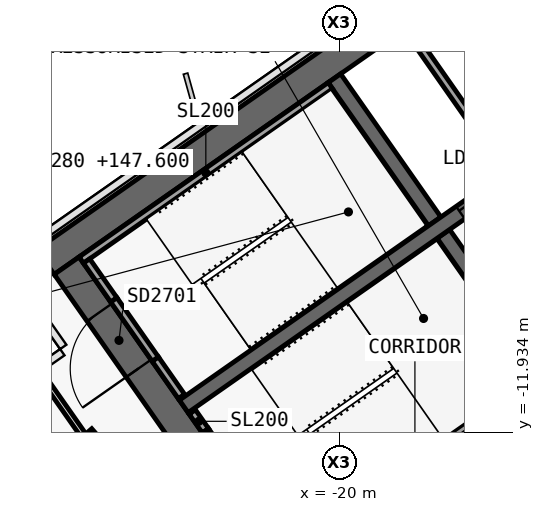
"""IFC4 building model, lengths in metres.
Left out: names, types, materials, properties, quantities, classifications, styles, units other than length and angle.
Written with IfcOpenShell. Run it as: python <this file> out.ifc"""

import sys

from ifc_helpers import new_model, si_unit, direction, frame, frame_2d, origin, place, context, subcontext, project, spatial, polyline, rectangle, outline, extrude, element, fill, save


model = new_model("IFC4")
c1 = context("Model", 3, precision=1e-05, world=origin(), true_north=direction((0.0, 1.0)))
c2 = subcontext(c1, "Body", "Model", "MODEL_VIEW")
j1 = project(units=[si_unit("LENGTHUNIT", "METRE"), si_unit("PLANEANGLEUNIT", "RADIAN")], contexts=[c1])
p1 = place(None, origin())
s1 = spatial("IfcSite", under=j1, at=p1, CompositionType="ELEMENT")
p2 = place(p1, origin())
s2 = spatial("IfcBuilding", under=s1, at=p2, CompositionType="ELEMENT")
p3 = place(p2, frame((0.0, 0.0, 147.6)))
s3 = spatial("IfcBuildingStorey", under=s2, at=p3, CompositionType="ELEMENT", Elevation=147.6)
p4 = place(p3, frame((0.029, 11.984, 0.0), z_axis=(0.0, 0.0, 1.0), x_axis=(-0.819151382952, -0.573577380837, 0.0)))
e1 = element("IfcWall", 1, at=p4, inside=s3, PredefinedType="SHEAR", context=c2, shape_type="SweptSolid", body=[
    extrude(outline(polyline([(33.898, 0.4), (0.56, 0.4), (-0.0, -0.4), (33.898, -0.4), (33.898, 0.4)])), origin(), (0.0, 0.0, 1.0), 3.9),
])
p5 = place(p3, frame((0.029, -0.712, 0.0), z_axis=(0.0, 0.0, 1.0), x_axis=(-0.819151758019, -0.573576845187, 0.0)))
e2 = element("IfcWall", 2, at=p5, inside=s3, PredefinedType="SHEAR", context=c2, shape_type="SweptSolid", body=[
    extrude(outline(polyline([(26.616, 0.4), (0.56, 0.4), (-0.0, -0.4), (26.616, -0.4), (26.616, 0.4)])), origin(), (0.0, 0.0, 1.0), 3.9),
])
p6 = place(p5, frame((2.966, 0.0, 0.0)))
e3 = element("IfcOpeningElement", 3, at=p6, cuts=e2, PredefinedType="OPENING", context=c2, shape_type="SweptSolid", body=[
    extrude(rectangle(XDim=2.4, YDim=2.1, at=frame_2d((1.2, 1.05))), frame((0.0, 0.41, 0.0), z_axis=(0.0, -1.0, 0.0), x_axis=(1.0, 0.0, 0.0)), (0.0, 0.0, 1.0), 0.82),
])
p7 = place(p5, frame((11.916, 0.0, 0.0)))
e4 = element("IfcOpeningElement", 4, at=p7, cuts=e2, PredefinedType="OPENING", context=c2, shape_type="SweptSolid", body=[
    extrude(rectangle(XDim=2.4, YDim=2.1, at=frame_2d((1.2, 1.05))), frame((0.0, 0.41, 0.0), z_axis=(0.0, -1.0, 0.0), x_axis=(1.0, 0.0, 0.0)), (0.0, 0.0, 1.0), 0.82),
])
p8 = place(p3, frame((-21.675, -15.421, 0.0), z_axis=(0.0, 0.0, 1.0), x_axis=(-0.573581815061, 0.819148278049, 0.0)))
e5 = element("IfcWall", 5, at=p8, inside=s3, PredefinedType="SHEAR", context=c2, shape_type="SweptSolid", body=[
    extrude(outline(polyline([(0.0, 0.4), (0.0, -0.4), (9.6, -0.4), (9.6, 0.4), (0.0, 0.4)])), origin(), (0.0, 0.0, 1.0), 3.9),
])
p9 = place(p8, frame((6.3, 0.0, 0.0)))
e6 = element("IfcOpeningElement", 6, at=p9, cuts=e5, PredefinedType="OPENING", context=c2, shape_type="SweptSolid", body=[
    extrude(rectangle(XDim=1.8, YDim=2.1, at=frame_2d((0.9, 1.05))), frame((0.0, 0.41, 0.0), z_axis=(0.0, -1.0, 0.0), x_axis=(1.0, 0.0, 0.0)), (0.0, 0.0, 1.0), 0.82),
])
p10 = place(p8, frame((2.1, 0.0, 0.0)))
e7 = element("IfcOpeningElement", 7, at=p10, cuts=e5, PredefinedType="OPENING", context=c2, shape_type="SweptSolid", body=[
    extrude(rectangle(XDim=1.8, YDim=2.1, at=frame_2d((0.9, 1.05))), frame((0.0, 0.41, 0.0), z_axis=(0.0, -1.0, 0.0), x_axis=(1.0, 0.0, 0.0)), (0.0, 0.0, 1.0), 0.82),
])
p11 = place(p3, frame((-14.63, -10.488, 0.0), z_axis=(0.0, 0.0, 1.0), x_axis=(-0.573611936273, 0.819127185829, 0.0)))
e8 = element("IfcWall", 8, at=p11, inside=s3, PredefinedType="SHEAR", context=c2, shape_type="SweptSolid", body=[
    extrude(outline(polyline([(4.6, 0.2), (0.0, 0.2), (0.0, -0.2), (4.6, -0.2), (4.6, 0.2)])), origin(), (0.0, 0.0, 1.0), 3.9),
])
p12 = place(p3, frame((-17.498, -6.392, 0.0), z_axis=(0.0, 0.0, 1.0), x_axis=(-0.573611936273, 0.819127185829, 0.0)))
e9 = element("IfcWall", 9, at=p12, inside=s3, PredefinedType="SHEAR", context=c2, shape_type="SweptSolid", body=[
    extrude(outline(polyline([(4.6, -0.2), (4.6, 0.2), (0.0, 0.2), (0.0, -0.2), (4.6, -0.2)])), origin(), (0.0, 0.0, 1.0), 3.9),
])
p13 = place(p3, frame((-2.638, 3.768, 0.0), z_axis=(0.0, 0.0, 1.0), x_axis=(-0.81915267502, -0.573575535572, 0.0)))
e10 = element("IfcWall", 10, at=p13, inside=s3, PredefinedType="SHEAR", context=c2, shape_type="SweptSolid", body=[
    extrude(outline(polyline([(26.2, 0.2), (0.0, 0.2), (0.0, -0.2), (26.2, -0.2), (26.2, 0.2)])), origin(), (0.0, 0.0, 1.0), 3.9),
])
p14 = place(p13, frame((1.169, 0.0, 0.0)))
e11 = element("IfcOpeningElement", 11, at=p14, cuts=e10, PredefinedType="OPENING", context=c2, shape_type="SweptSolid", body=[
    extrude(rectangle(XDim=1.1, YDim=2.1, at=frame_2d((0.55, 1.05))), frame((0.0, 0.21, 0.0), z_axis=(0.0, -1.0, 0.0), x_axis=(1.0, 0.0, 0.0)), (0.0, 0.0, 1.0), 0.42),
])
p15 = place(p13, frame((3.206, 0.0, 0.0)))
e12 = element("IfcOpeningElement", 12, at=p15, cuts=e10, PredefinedType="OPENING", context=c2, shape_type="SweptSolid", body=[
    extrude(rectangle(XDim=1.1, YDim=2.1, at=frame_2d((0.55, 1.05))), frame((0.0, 0.21, 0.0), z_axis=(0.0, -1.0, 0.0), x_axis=(1.0, 0.0, 0.0)), (0.0, 0.0, 1.0), 0.42),
])
p16 = place(p13, frame((5.244, 0.0, 0.0)))
e13 = element("IfcOpeningElement", 13, at=p16, cuts=e10, PredefinedType="OPENING", context=c2, shape_type="SweptSolid", body=[
    extrude(rectangle(XDim=1.1, YDim=2.1, at=frame_2d((0.55, 1.05))), frame((0.0, 0.21, 0.0), z_axis=(0.0, -1.0, 0.0), x_axis=(1.0, 0.0, 0.0)), (0.0, 0.0, 1.0), 0.42),
])
p17 = place(p13, frame((7.281, 0.0, 0.0)))
e14 = element("IfcOpeningElement", 14, at=p17, cuts=e10, PredefinedType="OPENING", context=c2, shape_type="SweptSolid", body=[
    extrude(rectangle(XDim=1.1, YDim=2.1, at=frame_2d((0.55, 1.05))), frame((0.0, 0.21, 0.0), z_axis=(0.0, -1.0, 0.0), x_axis=(1.0, 0.0, 0.0)), (0.0, 0.0, 1.0), 0.42),
])
p18 = place(p13, frame((9.688, 0.0, 0.0)))
e15 = element("IfcOpeningElement", 15, at=p18, cuts=e10, PredefinedType="OPENING", context=c2, shape_type="SweptSolid", body=[
    extrude(rectangle(XDim=1.1, YDim=2.1, at=frame_2d((0.55, 1.05))), frame((0.0, 0.21, 0.0), z_axis=(0.0, -1.0, 0.0), x_axis=(1.0, 0.0, 0.0)), (0.0, 0.0, 1.0), 0.42),
])
p19 = place(p13, frame((11.863, 0.0, 0.0)))
e16 = element("IfcOpeningElement", 16, at=p19, cuts=e10, PredefinedType="OPENING", context=c2, shape_type="SweptSolid", body=[
    extrude(rectangle(XDim=1.1, YDim=2.1, at=frame_2d((0.55, 1.05))), frame((0.0, 0.21, 0.0), z_axis=(0.0, -1.0, 0.0), x_axis=(1.0, 0.0, 0.0)), (0.0, 0.0, 1.0), 0.42),
])
p20 = place(p13, frame((14.038, 0.0, 0.0)))
e17 = element("IfcOpeningElement", 17, at=p20, cuts=e10, PredefinedType="OPENING", context=c2, shape_type="SweptSolid", body=[
    extrude(rectangle(XDim=1.1, YDim=2.1, at=frame_2d((0.55, 1.05))), frame((0.0, 0.21, 0.0), z_axis=(0.0, -1.0, 0.0), x_axis=(1.0, 0.0, 0.0)), (0.0, 0.0, 1.0), 0.42),
])
p21 = place(p13, frame((16.212, 0.0, 0.0)))
e18 = element("IfcOpeningElement", 18, at=p21, cuts=e10, PredefinedType="OPENING", context=c2, shape_type="SweptSolid", body=[
    extrude(rectangle(XDim=1.1, YDim=2.1, at=frame_2d((0.55, 1.05))), frame((0.0, 0.21, 0.0), z_axis=(0.0, -1.0, 0.0), x_axis=(1.0, 0.0, 0.0)), (0.0, 0.0, 1.0), 0.42),
])
p22 = place(p3, frame((-15.594, -5.059, 0.0), z_axis=(0.0, 0.0, 1.0), x_axis=(-0.573540709186, 0.819177059558, 0.0)))
e19 = element("IfcWall", 19, at=p22, inside=s3, PredefinedType="SOLIDWALL", context=c2, shape_type="SweptSolid", body=[
    extrude(rectangle(XDim=4.6, YDim=0.2, at=frame_2d((2.3, 0.0))), origin(), (0.0, 0.0, 1.0), 3.9),
])
p23 = place(p3, frame((-20.243, -2.821, 0.0), z_axis=(0.0, 0.0, 1.0), x_axis=(-0.819141584393, -0.57359137434, 0.0)))
e20 = element("IfcWall", 20, at=p23, inside=s3, PredefinedType="SOLIDWALL", context=c2, shape_type="SweptSolid", body=[
    extrude(rectangle(XDim=8.0, YDim=0.2, at=frame_2d((4.0, 0.0))), origin(), (0.0, 0.0, 1.0), 3.62),
])
p24 = place(p3, frame((-24.162, -10.998, 0.0), z_axis=(0.0, 0.0, 1.0), x_axis=(-0.573612502218, 0.819126789514, 0.0)))
e21 = element("IfcWall", 21, at=p24, inside=s3, PredefinedType="SOLIDWALL", context=c2, shape_type="SweptSolid", body=[
    extrude(rectangle(XDim=1.2, YDim=0.2, at=frame_2d((0.6, 0.0))), origin(), (0.0, 0.0, 1.0), 3.62),
])
p25 = place(p3, frame((-25.94, -8.458, 0.0), z_axis=(0.0, 0.0, 1.0), x_axis=(-0.573619628835, 0.819121798889, 0.0)))
e22 = element("IfcWall", 22, at=p25, inside=s3, PredefinedType="SOLIDWALL", context=c2, shape_type="SweptSolid", body=[
    extrude(rectangle(XDim=1.25, YDim=0.2, at=frame_2d((0.625, 0.0))), origin(), (0.0, 0.0, 1.0), 3.62),
])
p26 = place(p3, frame((-24.85, -10.014, 2.15), z_axis=(0.0, 0.0, 1.0), x_axis=(-0.573505465124, 0.819201734296, 0.0)))
e23 = element("IfcWall", 23, at=p26, inside=s3, PredefinedType="SOLIDWALL", context=c2, shape_type="SweptSolid", body=[
    extrude(rectangle(XDim=1.9, YDim=0.2, at=frame_2d((0.95, 0.0))), origin(), (0.0, 0.0, 1.0), 1.47),
])
p27 = place(p3, frame((-14.851, -10.521, 0.0), z_axis=(0.0, 0.0, 1.0), x_axis=(-0.819141584393, -0.57359137434, 0.0)))
e24 = element("IfcWall", 24, at=p27, inside=s3, PredefinedType="SOLIDWALL", context=c2, shape_type="SweptSolid", body=[
    extrude(rectangle(XDim=8.0, YDim=0.2, at=frame_2d((4.0, 0.0))), origin(), (0.0, 0.0, 1.0), 3.62),
])
p28 = place(p3, frame((-23.531, -11.898, 0.0), z_axis=(0.0, 0.0, 1.0), x_axis=(-0.573708088123, 0.819059844958, 0.0)))
e25 = element("IfcWall", 25, at=p28, inside=s3, PredefinedType="SOLIDWALL", context=c2, shape_type="SweptSolid", body=[
    extrude(rectangle(XDim=0.6, YDim=0.2, at=frame_2d((0.3, 0.0))), origin(), (0.0, 0.0, 1.0), 3.62),
])
p29 = place(p3, frame((-22.441, -13.455, 2.15), z_axis=(0.0, 0.0, 1.0), x_axis=(-0.573591692345, 0.819141361715, 0.0)))
e26 = element("IfcWall", 26, at=p29, inside=s3, PredefinedType="SOLIDWALL", context=c2, shape_type="SweptSolid", body=[
    extrude(rectangle(XDim=1.9, YDim=0.2, at=frame_2d((0.95, 0.0))), origin(), (0.0, 0.0, 1.0), 1.47),
])
p30 = place(p3, frame((-8.222, -9.175, 0.0), z_axis=(0.0, 0.0, 1.0), x_axis=(-0.819154519377, -0.573572901543, 0.0)))
e27 = element("IfcWall", 27, at=p30, inside=s3, PredefinedType="PARTITIONING", context=c2, shape_type="SweptSolid", body=[
    extrude(rectangle(XDim=12.004, YDim=0.15, at=frame_2d((6.002, 0.0))), origin(), (0.0, 0.0, 1.0), 3.0),
])
p31 = place(p30, frame((5.202, 0.0, 0.0)))
e28 = element("IfcOpeningElement", 28, at=p31, cuts=e27, PredefinedType="OPENING", context=c2, shape_type="SweptSolid", body=[
    extrude(rectangle(XDim=1.6, YDim=2.1, at=frame_2d((0.8, 1.05))), frame((0.0, 0.085, 0.0), z_axis=(0.0, -1.0, 0.0), x_axis=(1.0, 0.0, 0.0)), (0.0, 0.0, 1.0), 0.17),
])
p32 = place(p3, frame((-26.746, -12.014, 0.0), z_axis=(0.0, 0.0, 1.0), x_axis=(-0.573568836472, 0.819157365729, 0.0)))
e29 = element("IfcWall", 29, at=p32, inside=s3, PredefinedType="PARTITIONING", context=c2, shape_type="SweptSolid", body=[
    extrude(rectangle(XDim=2.0, YDim=0.15, at=frame_2d((1.0, 0.0))), origin(), (0.0, 0.0, 1.0), 3.0),
])
p33 = place(p3, frame((-22.284, -16.826, 0.0), z_axis=(0.0, 0.0, 1.0), x_axis=(-0.656758142177, 0.754101281449, 0.0)))
e30 = element("IfcWall", 30, at=p33, inside=s3, PredefinedType="PARTITIONING", context=c2, shape_type="SweptSolid", body=[
    extrude(rectangle(XDim=6.539, YDim=0.15, at=frame_2d((3.269, 0.0))), origin(), (0.0, 0.0, 1.0), 3.0),
])
p34 = place(p21, origin())
e31 = element("IfcDoor", 31, at=p34, inside=s3, OperationType="SLIDING_TO_RIGHT", PredefinedType="DOOR", context=c2, shape_type="SweptSolid", body=[
    extrude(rectangle(XDim=1.1, YDim=2.1, at=frame_2d((0.55, 1.05))), frame((0.0, 0.025, 0.0), z_axis=(0.0, -1.0, 0.0), x_axis=(1.0, 0.0, 0.0)), (0.0, 0.0, 1.0), 0.05),
])
fill(e18, e31)
p35 = place(p9, origin())
e32 = element("IfcDoor", 32, at=p35, inside=s3, OperationType="DOUBLE_DOOR_SINGLE_SWING", PredefinedType="DOOR", context=c2, shape_type="SweptSolid", body=[
    extrude(rectangle(XDim=1.8, YDim=2.1, at=frame_2d((0.9, 1.05))), frame((0.0, 0.025, 0.0), z_axis=(0.0, -1.0, 0.0), x_axis=(1.0, 0.0, 0.0)), (0.0, 0.0, 1.0), 0.05),
])
fill(e6, e32)
save(model, sys.argv[1])
